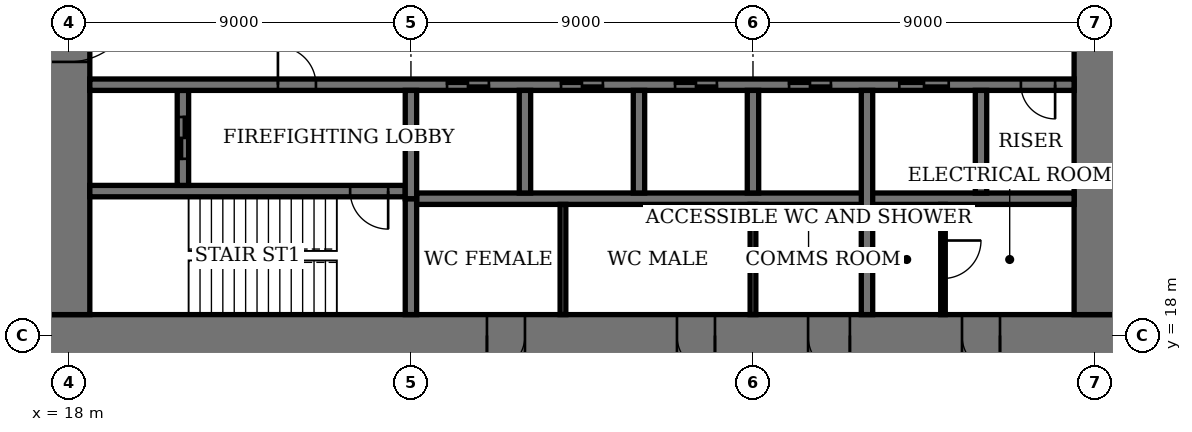
"""IFC4 building model, lengths in metres.
Left out: names, types, materials, properties, quantities, classifications, styles, units other than length and angle.
Written with IfcOpenShell. Run it as: python <this file> out.ifc"""

import sys

from ifc_helpers import new_model, si_unit, direction, frame, frame_2d, origin, place, context, subcontext, project, spatial, rectangle, extrude, element, fill, save


model = new_model("IFC4")
c1 = context("Model", 3, precision=1e-05, world=origin(), true_north=direction((0.0, 1.0)))
c2 = subcontext(c1, "Body", "Model", "MODEL_VIEW")
j1 = project(units=[si_unit("LENGTHUNIT", "METRE"), si_unit("PLANEANGLEUNIT", "RADIAN")], contexts=[c1])
p1 = place(None, origin())
s1 = spatial("IfcSite", under=j1, at=p1, CompositionType="ELEMENT")
p2 = place(p1, origin())
s2 = spatial("IfcBuilding", under=s1, at=p2, CompositionType="ELEMENT")
p3 = place(p2, frame((0.0, 0.0, 267.4)))
s3 = spatial("IfcBuildingStorey", under=s2, at=p3, CompositionType="ELEMENT", Elevation=267.4)
p4 = place(p3, frame((17.45, 18.0, 0.0), z_axis=(0.0, 0.0, 1.0), x_axis=(1.0, 0.0, 0.0)))
e1 = element("IfcWall", 1, at=p4, inside=s3, PredefinedType="SHEAR", context=c2, shape_type="SweptSolid", body=[
    extrude(rectangle(XDim=28.1, YDim=1.1, at=frame_2d((14.05, 0.0))), origin(), (0.0, 0.0, 1.0), 4.0),
])
p5 = place(p4, frame((11.55, 0.0, 0.0)))
e2 = element("IfcOpeningElement", 2, at=p5, cuts=e1, PredefinedType="OPENING", context=c2, shape_type="SweptSolid", body=[
    extrude(rectangle(XDim=1.0, YDim=2.4, at=frame_2d((0.5, 1.2))), frame((0.0, 0.56, 0.0), z_axis=(0.0, -1.0, 0.0), x_axis=(1.0, 0.0, 0.0)), (0.0, 0.0, 1.0), 1.12),
])
p6 = place(p4, frame((16.55, 0.0, 0.0)))
e3 = element("IfcOpeningElement", 3, at=p6, cuts=e1, PredefinedType="OPENING", context=c2, shape_type="SweptSolid", body=[
    extrude(rectangle(XDim=1.0, YDim=2.4, at=frame_2d((0.5, 1.2))), frame((0.0, 0.56, 0.0), z_axis=(0.0, -1.0, 0.0), x_axis=(1.0, 0.0, 0.0)), (0.0, 0.0, 1.0), 1.12),
])
p7 = place(p4, frame((20.0, 0.0, 0.0)))
e4 = element("IfcOpeningElement", 4, at=p7, cuts=e1, PredefinedType="OPENING", context=c2, shape_type="SweptSolid", body=[
    extrude(rectangle(XDim=1.1, YDim=2.4, at=frame_2d((0.55, 1.2))), frame((0.0, 0.56, 0.0), z_axis=(0.0, -1.0, 0.0), x_axis=(1.0, 0.0, 0.0)), (0.0, 0.0, 1.0), 1.12),
])
p8 = place(p4, frame((24.05, 0.0, 0.0)))
e5 = element("IfcOpeningElement", 5, at=p8, cuts=e1, PredefinedType="OPENING", context=c2, shape_type="SweptSolid", body=[
    extrude(rectangle(XDim=1.0, YDim=2.4, at=frame_2d((0.5, 1.2))), frame((0.0, 0.56, 0.0), z_axis=(0.0, -1.0, 0.0), x_axis=(1.0, 0.0, 0.0)), (0.0, 0.0, 1.0), 1.12),
])
p9 = place(p3, frame((18.0, 35.45, 0.0), z_axis=(0.0, 0.0, 1.0), x_axis=(0.0, -1.0, 0.0)))
e6 = element("IfcWall", 6, at=p9, inside=s3, PredefinedType="SHEAR", context=c2, shape_type="SweptSolid", body=[
    extrude(rectangle(XDim=16.9, YDim=1.1, at=frame_2d((8.45, 0.0))), origin(), (0.0, 0.0, 1.0), 4.0),
])
p10 = place(p9, frame((8.45, 0.0, 0.0)))
e7 = element("IfcOpeningElement", 7, at=p10, cuts=e6, PredefinedType="OPENING", context=c2, shape_type="SweptSolid", body=[
    extrude(rectangle(XDim=1.8, YDim=2.4, at=frame_2d((0.9, 1.2))), frame((0.0, 0.56, 0.0), z_axis=(0.0, -1.0, 0.0), x_axis=(1.0, 0.0, 0.0)), (0.0, 0.0, 1.0), 1.12),
])
p11 = place(p3, frame((45.0, 18.55, 0.0), z_axis=(0.0, 0.0, 1.0), x_axis=(0.0, 1.0, 0.0)))
e8 = element("IfcWall", 8, at=p11, inside=s3, PredefinedType="SHEAR", context=c2, shape_type="SweptSolid", body=[
    extrude(rectangle(XDim=16.9, YDim=1.1, at=frame_2d((8.45, 0.0))), origin(), (0.0, 0.0, 1.0), 4.0),
])
p12 = place(p11, frame((8.45, 0.0, 0.0)))
e9 = element("IfcOpeningElement", 9, at=p12, cuts=e8, PredefinedType="OPENING", context=c2, shape_type="SweptSolid", body=[
    extrude(rectangle(XDim=1.8, YDim=2.4, at=frame_2d((0.9, 1.2))), frame((0.0, 0.56, 0.0), z_axis=(0.0, -1.0, 0.0), x_axis=(1.0, 0.0, 0.0)), (0.0, 0.0, 1.0), 1.12),
])
p13 = place(p3, frame((18.55, 21.8, 0.0), z_axis=(0.0, 0.0, 1.0), x_axis=(1.0, 0.0, 0.0)))
e10 = element("IfcWall", 10, at=p13, inside=s3, PredefinedType="SHEAR", context=c2, shape_type="SweptSolid", body=[
    extrude(rectangle(XDim=8.3, YDim=0.3, at=frame_2d((4.15, 0.0))), origin(), (0.0, 0.0, 1.0), 4.0),
])
p14 = place(p13, frame((6.85, 0.0, 0.0)))
e11 = element("IfcOpeningElement", 11, at=p14, cuts=e10, PredefinedType="OPENING", context=c2, shape_type="SweptSolid", body=[
    extrude(rectangle(XDim=1.0, YDim=2.4, at=frame_2d((0.5, 1.2))), frame((0.0, 0.16, 0.0), z_axis=(0.0, -1.0, 0.0), x_axis=(1.0, 0.0, 0.0)), (0.0, 0.0, 1.0), 0.32),
])
p15 = place(p3, frame((27.0, 18.55, 0.0), z_axis=(0.0, 0.0, 1.0), x_axis=(0.0, 1.0, 0.0)))
e12 = element("IfcWall", 12, at=p15, inside=s3, PredefinedType="SHEAR", context=c2, shape_type="SweptSolid", body=[
    extrude(rectangle(XDim=3.05, YDim=0.3, at=frame_2d((1.525, 0.0))), origin(), (0.0, 0.0, 1.0), 4.0),
])
p16 = place(p3, frame((21.0, 21.95, 0.0), z_axis=(0.0, 0.0, 1.0), x_axis=(0.0, 1.0, 0.0)))
e13 = element("IfcWall", 13, at=p16, inside=s3, PredefinedType="SHEAR", context=c2, shape_type="SweptSolid", body=[
    extrude(rectangle(XDim=2.5, YDim=0.3, at=frame_2d((1.25, 0.0))), origin(), (0.0, 0.0, 1.0), 4.0),
])
p17 = place(p16, frame((0.7, 0.0, 0.0)))
e14 = element("IfcOpeningElement", 14, at=p17, cuts=e13, PredefinedType="OPENING", context=c2, shape_type="SweptSolid", body=[
    extrude(rectangle(XDim=1.1, YDim=2.4, at=frame_2d((0.55, 1.2))), frame((0.0, 0.16, 0.0), z_axis=(0.0, -1.0, 0.0), x_axis=(1.0, 0.0, 0.0)), (0.0, 0.0, 1.0), 0.32),
])
p18 = place(p3, frame((18.55, 24.6, 0.0), z_axis=(0.0, 0.0, 1.0), x_axis=(1.0, 0.0, 0.0)))
e15 = element("IfcWall", 15, at=p18, inside=s3, PredefinedType="SHEAR", context=c2, shape_type="SweptSolid", body=[
    extrude(rectangle(XDim=25.9, YDim=0.3, at=frame_2d((12.95, 0.0))), origin(), (0.0, 0.0, 1.0), 4.0),
])
p19 = place(p18, frame((4.95, 0.0, 0.0)))
e16 = element("IfcOpeningElement", 16, at=p19, cuts=e15, PredefinedType="OPENING", context=c2, shape_type="SweptSolid", body=[
    extrude(rectangle(XDim=1.0, YDim=2.4, at=frame_2d((0.5, 1.2))), frame((0.0, 0.16, 0.0), z_axis=(0.0, -1.0, 0.0), x_axis=(1.0, 0.0, 0.0)), (0.0, 0.0, 1.0), 0.32),
])
p20 = place(p18, frame((24.5, 0.0, 0.0)))
e17 = element("IfcOpeningElement", 17, at=p20, cuts=e15, PredefinedType="OPENING", context=c2, shape_type="SweptSolid", body=[
    extrude(rectangle(XDim=0.9, YDim=2.1, at=frame_2d((0.45, 1.05))), frame((0.0, 0.16, 0.0), z_axis=(0.0, -1.0, 0.0), x_axis=(1.0, 0.0, 0.0)), (0.0, 0.0, 1.0), 0.32),
])
p21 = place(p18, frame((9.4, 0.0, 0.0)))
e18 = element("IfcOpeningElement", 18, at=p21, cuts=e15, PredefinedType="OPENING", context=c2, shape_type="SweptSolid", body=[
    extrude(rectangle(XDim=1.1, YDim=2.4, at=frame_2d((0.55, 1.2))), frame((0.0, 0.16, 0.0), z_axis=(0.0, -1.0, 0.0), x_axis=(1.0, 0.0, 0.0)), (0.0, 0.0, 1.0), 0.32),
])
p22 = place(p18, frame((12.4, 0.0, 0.0)))
e19 = element("IfcOpeningElement", 19, at=p22, cuts=e15, PredefinedType="OPENING", context=c2, shape_type="SweptSolid", body=[
    extrude(rectangle(XDim=1.1, YDim=2.4, at=frame_2d((0.55, 1.2))), frame((0.0, 0.16, 0.0), z_axis=(0.0, -1.0, 0.0), x_axis=(1.0, 0.0, 0.0)), (0.0, 0.0, 1.0), 0.32),
])
p23 = place(p18, frame((15.4, 0.0, 0.0)))
e20 = element("IfcOpeningElement", 20, at=p23, cuts=e15, PredefinedType="OPENING", context=c2, shape_type="SweptSolid", body=[
    extrude(rectangle(XDim=1.1, YDim=2.4, at=frame_2d((0.55, 1.2))), frame((0.0, 0.16, 0.0), z_axis=(0.0, -1.0, 0.0), x_axis=(1.0, 0.0, 0.0)), (0.0, 0.0, 1.0), 0.32),
])
p24 = place(p18, frame((18.4, 0.0, 0.0)))
e21 = element("IfcOpeningElement", 21, at=p24, cuts=e15, PredefinedType="OPENING", context=c2, shape_type="SweptSolid", body=[
    extrude(rectangle(XDim=1.1, YDim=2.4, at=frame_2d((0.55, 1.2))), frame((0.0, 0.16, 0.0), z_axis=(0.0, -1.0, 0.0), x_axis=(1.0, 0.0, 0.0)), (0.0, 0.0, 1.0), 0.32),
])
p25 = place(p18, frame((21.3, 0.0, 0.0)))
e22 = element("IfcOpeningElement", 22, at=p25, cuts=e15, PredefinedType="OPENING", context=c2, shape_type="SweptSolid", body=[
    extrude(rectangle(XDim=1.3, YDim=2.4, at=frame_2d((0.65, 1.2))), frame((0.0, 0.16, 0.0), z_axis=(0.0, -1.0, 0.0), x_axis=(1.0, 0.0, 0.0)), (0.0, 0.0, 1.0), 0.32),
])
p26 = place(p3, frame((27.15, 21.6, 0.0), z_axis=(0.0, 0.0, 1.0), x_axis=(1.0, 0.0, 0.0)))
e23 = element("IfcWall", 23, at=p26, inside=s3, PredefinedType="SHEAR", context=c2, shape_type="SweptSolid", body=[
    extrude(rectangle(XDim=17.3, YDim=0.3, at=frame_2d((8.65, 0.0))), origin(), (0.0, 0.0, 1.0), 4.0),
])
for number, where, z_axis, x_axis in (
    (24, (30.0, 21.75, 0.0), (0.0, 0.0, 1.0), (0.0, 1.0, 0.0)),
    (25, (33.0, 21.75, 0.0), (0.0, 0.0, 1.0), (0.0, 1.0, 0.0)),
    (26, (36.0, 21.75, 0.0), (0.0, 0.0, 1.0), (0.0, 1.0, 0.0)),
):
    element("IfcWall", number, at=place(p3, frame(where, z_axis=z_axis, x_axis=x_axis)), inside=s3, PredefinedType="SHEAR", context=c2, shape_type="SweptSolid", body=[
        extrude(rectangle(XDim=2.7, YDim=0.3, at=frame_2d((1.35, 0.0))), origin(), (0.0, 0.0, 1.0), 4.0),
    ])
p27 = place(p3, frame((39.0, 18.55, 0.0), z_axis=(0.0, 0.0, 1.0), x_axis=(0.0, 1.0, 0.0)))
e27 = element("IfcWall", 27, at=p27, inside=s3, PredefinedType="SHEAR", context=c2, shape_type="SweptSolid", body=[
    extrude(rectangle(XDim=5.9, YDim=0.3, at=frame_2d((2.95, 0.0))), origin(), (0.0, 0.0, 1.0), 4.0),
])
p28 = place(p3, frame((42.0, 21.75, 0.0), z_axis=(0.0, 0.0, 1.0), x_axis=(0.0, 1.0, 0.0)))
e28 = element("IfcWall", 28, at=p28, inside=s3, PredefinedType="SHEAR", context=c2, shape_type="SweptSolid", body=[
    extrude(rectangle(XDim=2.7, YDim=0.3, at=frame_2d((1.35, 0.0))), origin(), (0.0, 0.0, 1.0), 4.0),
])
p29 = place(p3, frame((27.0, 21.6, 0.0), z_axis=(0.0, 0.0, 1.0), x_axis=(0.0, 1.0, 0.0)))
e29 = element("IfcWall", 29, at=p29, inside=s3, PredefinedType="SHEAR", context=c2, shape_type="SweptSolid", body=[
    extrude(rectangle(XDim=2.85, YDim=0.3, at=frame_2d((1.425, 0.0))), origin(), (0.0, 0.0, 1.0), 4.0),
])
for number, where, z_axis, x_axis in (
    (30, (31.0, 18.55, 0.0), (0.0, 0.0, 1.0), (0.0, 1.0, 0.0)),
    (31, (36.0, 18.55, 0.0), (0.0, 0.0, 1.0), (0.0, 1.0, 0.0)),
):
    element("IfcWall", number, at=place(p3, frame(where, z_axis=z_axis, x_axis=x_axis)), inside=s3, PredefinedType="PARTITIONING", context=c2, shape_type="SweptSolid", body=[
        extrude(rectangle(XDim=2.9, YDim=0.15, at=frame_2d((1.45, 0.0))), origin(), (0.0, 0.0, 1.0), 3.75),
    ])
p30 = place(p3, frame((41.0, 18.55, 0.0), z_axis=(0.0, 0.0, 1.0), x_axis=(0.0, 1.0, 0.0)))
e32 = element("IfcWall", 32, at=p30, inside=s3, PredefinedType="PARTITIONING", context=c2, shape_type="SweptSolid", body=[
    extrude(rectangle(XDim=2.9, YDim=0.12, at=frame_2d((1.45, 0.0))), origin(), (0.0, 0.0, 1.0), 3.75),
])
p31 = place(p30, frame((0.95, 0.0, 0.0)))
e33 = element("IfcOpeningElement", 33, at=p31, cuts=e32, PredefinedType="OPENING", context=c2, shape_type="SweptSolid", body=[
    extrude(rectangle(XDim=1.0, YDim=2.4, at=frame_2d((0.5, 1.2))), frame((0.0, 0.07, 0.0), z_axis=(0.0, -1.0, 0.0), x_axis=(1.0, 0.0, 0.0)), (0.0, 0.0, 1.0), 0.14),
])
p32 = place(p10, origin())
e34 = element("IfcDoor", 34, at=p32, inside=s3, OperationType="DOUBLE_DOOR_DOUBLE_SWING", PredefinedType="DOOR", context=c2, shape_type="SweptSolid", body=[
    extrude(rectangle(XDim=1.8, YDim=2.4, at=frame_2d((0.9, 1.2))), frame((0.0, 0.03, 0.0), z_axis=(0.0, -1.0, 0.0), x_axis=(1.0, 0.0, 0.0)), (0.0, 0.0, 1.0), 0.06),
    extrude(rectangle(XDim=0.04, YDim=2.4, at=frame_2d((0.02, 1.2))), frame((0.0, 0.55, 0.0), z_axis=(0.0, -1.0, 0.0), x_axis=(1.0, 0.0, 0.0)), (0.0, 0.0, 1.0), 1.1),
    extrude(rectangle(XDim=0.04, YDim=2.4, at=frame_2d((1.78, 1.2))), frame((0.0, 0.55, 0.0), z_axis=(0.0, -1.0, 0.0), x_axis=(1.0, 0.0, 0.0)), (0.0, 0.0, 1.0), 1.1),
    extrude(rectangle(XDim=1.8, YDim=0.04, at=frame_2d((0.9, 2.38))), frame((0.0, 0.55, 0.0), z_axis=(0.0, -1.0, 0.0), x_axis=(1.0, 0.0, 0.0)), (0.0, 0.0, 1.0), 1.1),
])
fill(e7, e34)
p33 = place(p5, origin())
e35 = element("IfcDoor", 35, at=p33, inside=s3, OperationType="SINGLE_SWING_LEFT", PredefinedType="DOOR", context=c2, shape_type="SweptSolid", body=[
    extrude(rectangle(XDim=1.0, YDim=2.4, at=frame_2d((0.5, 1.2))), frame((0.0, 0.025, 0.0), z_axis=(0.0, -1.0, 0.0), x_axis=(1.0, 0.0, 0.0)), (0.0, 0.0, 1.0), 0.05),
    extrude(rectangle(XDim=0.04, YDim=2.4, at=frame_2d((0.02, 1.2))), frame((0.0, 0.4, 0.0), z_axis=(0.0, -1.0, 0.0), x_axis=(1.0, 0.0, 0.0)), (0.0, 0.0, 1.0), 0.8),
    extrude(rectangle(XDim=0.04, YDim=2.4, at=frame_2d((0.98, 1.2))), frame((0.0, 0.4, 0.0), z_axis=(0.0, -1.0, 0.0), x_axis=(1.0, 0.0, 0.0)), (0.0, 0.0, 1.0), 0.8),
    extrude(rectangle(XDim=1.0, YDim=0.04, at=frame_2d((0.5, 2.38))), frame((0.0, 0.4, 0.0), z_axis=(0.0, -1.0, 0.0), x_axis=(1.0, 0.0, 0.0)), (0.0, 0.0, 1.0), 0.8),
])
fill(e2, e35)
p34 = place(p6, origin())
e36 = element("IfcDoor", 36, at=p34, inside=s3, OperationType="SINGLE_SWING_RIGHT", PredefinedType="DOOR", context=c2, shape_type="SweptSolid", body=[
    extrude(rectangle(XDim=1.0, YDim=2.4, at=frame_2d((0.5, 1.2))), frame((0.0, 0.025, 0.0), z_axis=(0.0, -1.0, 0.0), x_axis=(1.0, 0.0, 0.0)), (0.0, 0.0, 1.0), 0.05),
    extrude(rectangle(XDim=0.04, YDim=2.4, at=frame_2d((0.02, 1.2))), frame((0.0, 0.4, 0.0), z_axis=(0.0, -1.0, 0.0), x_axis=(1.0, 0.0, 0.0)), (0.0, 0.0, 1.0), 0.8),
    extrude(rectangle(XDim=0.04, YDim=2.4, at=frame_2d((0.98, 1.2))), frame((0.0, 0.4, 0.0), z_axis=(0.0, -1.0, 0.0), x_axis=(1.0, 0.0, 0.0)), (0.0, 0.0, 1.0), 0.8),
    extrude(rectangle(XDim=1.0, YDim=0.04, at=frame_2d((0.5, 2.38))), frame((0.0, 0.4, 0.0), z_axis=(0.0, -1.0, 0.0), x_axis=(1.0, 0.0, 0.0)), (0.0, 0.0, 1.0), 0.8),
])
fill(e3, e36)
p35 = place(p7, origin())
e37 = element("IfcDoor", 37, at=p35, inside=s3, OperationType="SINGLE_SWING_RIGHT", PredefinedType="DOOR", context=c2, shape_type="SweptSolid", body=[
    extrude(rectangle(XDim=1.1, YDim=2.4, at=frame_2d((0.55, 1.2))), frame((0.0, 0.025, 0.0), z_axis=(0.0, -1.0, 0.0), x_axis=(1.0, 0.0, 0.0)), (0.0, 0.0, 1.0), 0.05),
    extrude(rectangle(XDim=0.04, YDim=2.4, at=frame_2d((0.02, 1.2))), frame((0.0, 0.44, 0.0), z_axis=(0.0, -1.0, 0.0), x_axis=(1.0, 0.0, 0.0)), (0.0, 0.0, 1.0), 0.88),
    extrude(rectangle(XDim=0.04, YDim=2.4, at=frame_2d((1.08, 1.2))), frame((0.0, 0.44, 0.0), z_axis=(0.0, -1.0, 0.0), x_axis=(1.0, 0.0, 0.0)), (0.0, 0.0, 1.0), 0.88),
    extrude(rectangle(XDim=1.1, YDim=0.04, at=frame_2d((0.55, 2.38))), frame((0.0, 0.44, 0.0), z_axis=(0.0, -1.0, 0.0), x_axis=(1.0, 0.0, 0.0)), (0.0, 0.0, 1.0), 0.88),
])
fill(e4, e37)
p36 = place(p8, origin())
e38 = element("IfcDoor", 38, at=p36, inside=s3, OperationType="SINGLE_SWING_RIGHT", PredefinedType="DOOR", context=c2, shape_type="SweptSolid", body=[
    extrude(rectangle(XDim=1.0, YDim=2.4, at=frame_2d((0.5, 1.2))), frame((0.0, 0.025, 0.0), z_axis=(0.0, -1.0, 0.0), x_axis=(1.0, 0.0, 0.0)), (0.0, 0.0, 1.0), 0.05),
    extrude(rectangle(XDim=0.04, YDim=2.4, at=frame_2d((0.02, 1.2))), frame((0.0, 0.4, 0.0), z_axis=(0.0, -1.0, 0.0), x_axis=(1.0, 0.0, 0.0)), (0.0, 0.0, 1.0), 0.8),
    extrude(rectangle(XDim=0.04, YDim=2.4, at=frame_2d((0.98, 1.2))), frame((0.0, 0.4, 0.0), z_axis=(0.0, -1.0, 0.0), x_axis=(1.0, 0.0, 0.0)), (0.0, 0.0, 1.0), 0.8),
    extrude(rectangle(XDim=1.0, YDim=0.04, at=frame_2d((0.5, 2.38))), frame((0.0, 0.4, 0.0), z_axis=(0.0, -1.0, 0.0), x_axis=(1.0, 0.0, 0.0)), (0.0, 0.0, 1.0), 0.8),
])
fill(e5, e38)
p37 = place(p14, origin())
e39 = element("IfcDoor", 39, at=p37, inside=s3, OperationType="SINGLE_SWING_RIGHT", PredefinedType="DOOR", context=c2, shape_type="SweptSolid", body=[
    extrude(rectangle(XDim=1.0, YDim=2.4, at=frame_2d((0.5, 1.2))), frame((0.0, 0.03, 0.0), z_axis=(0.0, -1.0, 0.0), x_axis=(1.0, 0.0, 0.0)), (0.0, 0.0, 1.0), 0.06),
])
fill(e11, e39)
p38 = place(p19, origin())
e40 = element("IfcDoor", 40, at=p38, inside=s3, OperationType="SINGLE_SWING_RIGHT", PredefinedType="DOOR", context=c2, shape_type="SweptSolid", body=[
    extrude(rectangle(XDim=1.0, YDim=2.4, at=frame_2d((0.5, 1.2))), frame((0.0, 0.03, 0.0), z_axis=(0.0, -1.0, 0.0), x_axis=(1.0, 0.0, 0.0)), (0.0, 0.0, 1.0), 0.06),
])
fill(e16, e40)
p39 = place(p20, origin())
e41 = element("IfcDoor", 41, at=p39, inside=s3, OperationType="SINGLE_SWING_RIGHT", PredefinedType="DOOR", context=c2, shape_type="SweptSolid", body=[
    extrude(rectangle(XDim=0.9, YDim=2.1, at=frame_2d((0.45, 1.05))), frame((0.0, 0.03, 0.0), z_axis=(0.0, -1.0, 0.0), x_axis=(1.0, 0.0, 0.0)), (0.0, 0.0, 1.0), 0.06),
])
fill(e17, e41)
p40 = place(p31, origin())
e42 = element("IfcDoor", 42, at=p40, inside=s3, OperationType="SINGLE_SWING_RIGHT", PredefinedType="DOOR", context=c2, shape_type="SweptSolid", body=[
    extrude(rectangle(XDim=1.0, YDim=2.4, at=frame_2d((0.5, 1.2))), frame((0.0, 0.03, 0.0), z_axis=(0.0, -1.0, 0.0), x_axis=(1.0, 0.0, 0.0)), (0.0, 0.0, 1.0), 0.06),
])
fill(e33, e42)
p41 = place(p21, origin())
e43 = element("IfcDoor", 43, at=p41, inside=s3, OperationType="DOUBLE_DOOR_SLIDING", PredefinedType="DOOR", context=c2, shape_type="SweptSolid", body=[
    extrude(rectangle(XDim=1.1, YDim=2.4, at=frame_2d((0.55, 1.2))), frame((0.0, 0.02, 0.0), z_axis=(0.0, -1.0, 0.0), x_axis=(1.0, 0.0, 0.0)), (0.0, 0.0, 1.0), 0.04),
])
fill(e18, e43)
p42 = place(p22, origin())
e44 = element("IfcDoor", 44, at=p42, inside=s3, OperationType="DOUBLE_DOOR_SLIDING", PredefinedType="DOOR", context=c2, shape_type="SweptSolid", body=[
    extrude(rectangle(XDim=1.1, YDim=2.4, at=frame_2d((0.55, 1.2))), frame((0.0, 0.02, 0.0), z_axis=(0.0, -1.0, 0.0), x_axis=(1.0, 0.0, 0.0)), (0.0, 0.0, 1.0), 0.04),
])
fill(e19, e44)
p43 = place(p23, origin())
e45 = element("IfcDoor", 45, at=p43, inside=s3, OperationType="DOUBLE_DOOR_SLIDING", PredefinedType="DOOR", context=c2, shape_type="SweptSolid", body=[
    extrude(rectangle(XDim=1.1, YDim=2.4, at=frame_2d((0.55, 1.2))), frame((0.0, 0.02, 0.0), z_axis=(0.0, -1.0, 0.0), x_axis=(1.0, 0.0, 0.0)), (0.0, 0.0, 1.0), 0.04),
])
fill(e20, e45)
p44 = place(p24, origin())
e46 = element("IfcDoor", 46, at=p44, inside=s3, OperationType="DOUBLE_DOOR_SLIDING", PredefinedType="DOOR", context=c2, shape_type="SweptSolid", body=[
    extrude(rectangle(XDim=1.1, YDim=2.4, at=frame_2d((0.55, 1.2))), frame((0.0, 0.02, 0.0), z_axis=(0.0, -1.0, 0.0), x_axis=(1.0, 0.0, 0.0)), (0.0, 0.0, 1.0), 0.04),
])
fill(e21, e46)
p45 = place(p25, origin())
e47 = element("IfcDoor", 47, at=p45, inside=s3, OperationType="DOUBLE_DOOR_SLIDING", PredefinedType="DOOR", context=c2, shape_type="SweptSolid", body=[
    extrude(rectangle(XDim=1.3, YDim=2.4, at=frame_2d((0.65, 1.2))), frame((0.0, 0.02, 0.0), z_axis=(0.0, -1.0, 0.0), x_axis=(1.0, 0.0, 0.0)), (0.0, 0.0, 1.0), 0.04),
])
fill(e22, e47)
p46 = place(p17, origin())
e48 = element("IfcDoor", 48, at=p46, inside=s3, OperationType="DOUBLE_DOOR_SLIDING", PredefinedType="DOOR", context=c2, shape_type="SweptSolid", body=[
    extrude(rectangle(XDim=1.1, YDim=2.4, at=frame_2d((0.55, 1.2))), frame((0.0, 0.03, 0.0), z_axis=(0.0, -1.0, 0.0), x_axis=(1.0, 0.0, 0.0)), (0.0, 0.0, 1.0), 0.06),
])
fill(e14, e48)
save(model, sys.argv[1])
